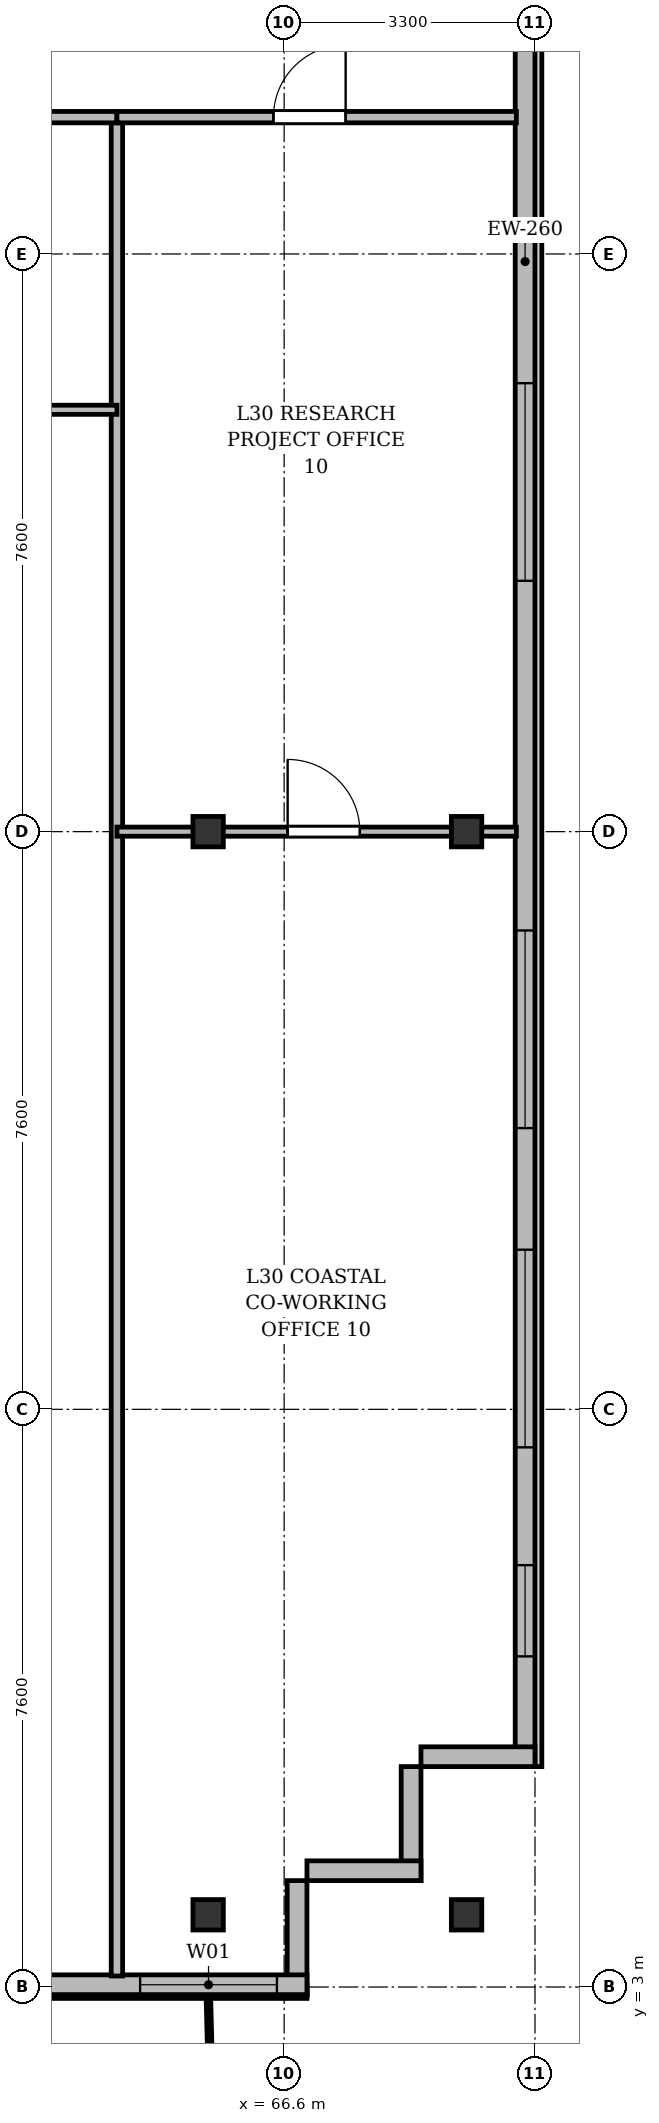
"""IFC4 building model, lengths in metres.
Left out: names, types, materials, properties, quantities, classifications, styles, units other than length and angle.
Written with IfcOpenShell. Run it as: python <this file> out.ifc"""

import sys

from ifc_helpers import new_model, si_unit, direction, frame, frame_2d, origin, origin_2d, place, context, subcontext, project, spatial, rectangle, i_section, extrude, source, transform, mapped, element, fill, save


model = new_model("IFC4")
c1 = context("Model", 3, precision=1e-05, world=origin(), true_north=direction((0.0, 1.0)))
c2 = subcontext(c1, "Body", "Model", "MODEL_VIEW")
j1 = project(units=[si_unit("LENGTHUNIT", "METRE"), si_unit("PLANEANGLEUNIT", "RADIAN")], contexts=[c1])
p1 = place(None, origin())
s1 = spatial("IfcSite", under=j1, at=p1, CompositionType="ELEMENT")
p2 = place(p1, origin())
s2 = spatial("IfcBuilding", under=s1, at=p2, CompositionType="ELEMENT")
p3 = place(p2, frame((0.0, 0.0, 117.7)))
s3 = spatial("IfcBuildingStorey", under=s2, at=p3, CompositionType="ELEMENT", Elevation=117.7)
m1 = source(origin(), c2, "Body", "SweptSolid", [
    extrude(i_section(OverallWidth=0.4, OverallDepth=0.4, WebThickness=0.022, FlangeThickness=0.035, at=origin_2d()), origin(), (0.0, 0.0, 1.0), 3.6),
])
for number, where, z_axis, x_axis in (
    (1, (65.6, 3.95, 0.0), (0.0, 0.0, 1.0), (1.0, 0.0, 0.0)),
    (2, (65.6, 18.2, 0.0), (0.0, 0.0, 1.0), (1.0, 0.0, 0.0)),
    (3, (69.0, 3.95, 0.0), (0.0, 0.0, 1.0), (1.0, 0.0, 0.0)),
    (4, (69.0, 18.2, 0.0), (0.0, 0.0, 1.0), (1.0, 0.0, 0.0)),
):
    element("IfcColumn", number, at=place(p3, frame(where, z_axis=z_axis, x_axis=x_axis)), inside=s3, PredefinedType="COLUMN", context=c2, shape_type="MappedRepresentation", body=[
        mapped(m1, transform((0.0, 0.0, 0.0), x_axis=(1.0, 0.0, 0.0), y_axis=(0.0, 1.0, 0.0), z_axis=(0.0, 0.0, 1.0), scale=1.0)),
    ])
p4 = place(p3, frame((69.77, 45.5, 0.0), z_axis=(0.0, 0.0, 1.0), x_axis=(0.0, -1.0, 0.0)))
e5 = element("IfcWall", 5, at=p4, inside=s3, PredefinedType="SOLIDWALL", context=c2, shape_type="SweptSolid", body=[
    extrude(rectangle(XDim=39.6, YDim=0.26, at=frame_2d((19.8, 0.0))), origin(), (0.0, 0.0, 1.0), 3.34),
])
p5 = place(p4, frame((36.95, 0.0, 0.92)))
e6 = element("IfcOpeningElement", 6, at=p5, cuts=e5, PredefinedType="OPENING", context=c2, shape_type="SweptSolid", body=[
    extrude(rectangle(XDim=1.2, YDim=1.65, at=frame_2d((0.6, 0.825))), frame((0.0, 0.14, 0.0), z_axis=(0.0, -1.0, 0.0), x_axis=(1.0, 0.0, 0.0)), (0.0, 0.0, 1.0), 0.28),
])
p6 = place(p4, frame((32.8, 0.0, 0.92)))
e7 = element("IfcOpeningElement", 7, at=p6, cuts=e5, PredefinedType="OPENING", context=c2, shape_type="SweptSolid", body=[
    extrude(rectangle(XDim=2.6, YDim=1.9, at=frame_2d((1.3, 0.95))), frame((0.0, 0.14, 0.0), z_axis=(0.0, -1.0, 0.0), x_axis=(1.0, 0.0, 0.0)), (0.0, 0.0, 1.0), 0.28),
])
p7 = place(p4, frame((28.6, 0.0, 0.92)))
e8 = element("IfcOpeningElement", 8, at=p7, cuts=e5, PredefinedType="OPENING", context=c2, shape_type="SweptSolid", body=[
    extrude(rectangle(XDim=2.6, YDim=1.9, at=frame_2d((1.3, 0.95))), frame((0.0, 0.14, 0.0), z_axis=(0.0, -1.0, 0.0), x_axis=(1.0, 0.0, 0.0)), (0.0, 0.0, 1.0), 0.28),
])
p8 = place(p4, frame((21.4, 0.0, 0.92)))
e9 = element("IfcOpeningElement", 9, at=p8, cuts=e5, PredefinedType="OPENING", context=c2, shape_type="SweptSolid", body=[
    extrude(rectangle(XDim=2.6, YDim=1.9, at=frame_2d((1.3, 0.95))), frame((0.0, 0.14, 0.0), z_axis=(0.0, -1.0, 0.0), x_axis=(1.0, 0.0, 0.0)), (0.0, 0.0, 1.0), 0.28),
])
p9 = place(p4, frame((7.4, 0.0, 0.92)))
e10 = element("IfcOpeningElement", 10, at=p9, cuts=e5, PredefinedType="OPENING", context=c2, shape_type="SweptSolid", body=[
    extrude(rectangle(XDim=2.6, YDim=1.9, at=frame_2d((1.3, 0.95))), frame((0.0, 0.14, 0.0), z_axis=(0.0, -1.0, 0.0), x_axis=(1.0, 0.0, 0.0)), (0.0, 0.0, 1.0), 0.28),
])
p10 = place(p4, frame((4.5, 0.0, 0.92)))
e11 = element("IfcOpeningElement", 11, at=p10, cuts=e5, PredefinedType="OPENING", context=c2, shape_type="SweptSolid", body=[
    extrude(rectangle(XDim=1.2, YDim=1.65, at=frame_2d((0.6, 0.825))), frame((0.0, 0.14, 0.0), z_axis=(0.0, -1.0, 0.0), x_axis=(1.0, 0.0, 0.0)), (0.0, 0.0, 1.0), 0.28),
])
p11 = place(p4, frame((1.15, 0.0, 0.92)))
e12 = element("IfcOpeningElement", 12, at=p11, cuts=e5, PredefinedType="OPENING", context=c2, shape_type="SweptSolid", body=[
    extrude(rectangle(XDim=1.2, YDim=1.65, at=frame_2d((0.6, 0.825))), frame((0.0, 0.14, 0.0), z_axis=(0.0, -1.0, 0.0), x_axis=(1.0, 0.0, 0.0)), (0.0, 0.0, 1.0), 0.28),
])
p12 = place(p3, frame((69.9, 6.03, 0.0), z_axis=(0.0, 0.0, 1.0), x_axis=(-1.0, 0.0, 0.0)))
e13 = element("IfcWall", 13, at=p12, inside=s3, PredefinedType="SOLIDWALL", context=c2, shape_type="SweptSolid", body=[
    extrude(rectangle(XDim=1.5, YDim=0.26, at=frame_2d((0.75, 0.0))), origin(), (0.0, 0.0, 1.0), 2.84),
])
for number, where, z_axis, x_axis in (
    (14, (68.27, 5.9, 0.0), (0.0, 0.0, 1.0), (0.0, -1.0, 0.0)),
    (15, (68.4, 4.53, 0.0), (0.0, 0.0, 1.0), (-1.0, 0.0, 0.0)),
):
    element("IfcWall", number, at=place(p3, frame(where, z_axis=z_axis, x_axis=x_axis)), inside=s3, PredefinedType="SOLIDWALL", context=c2, shape_type="SweptSolid", body=[
        extrude(rectangle(XDim=1.5, YDim=0.26, at=frame_2d((0.75, 0.0))), origin(), (0.0, 0.0, 1.0), 3.34),
    ])
p13 = place(p3, frame((66.77, 4.4, 0.0), z_axis=(0.0, 0.0, 1.0), x_axis=(0.0, -1.0, 0.0)))
e16 = element("IfcWall", 16, at=p13, inside=s3, PredefinedType="SOLIDWALL", context=c2, shape_type="SweptSolid", body=[
    extrude(rectangle(XDim=1.5, YDim=0.26, at=frame_2d((0.75, 0.0))), origin(), (0.0, 0.0, 1.0), 2.752),
])
p14 = place(p3, frame((66.9, 3.03, 0.0), z_axis=(0.0, 0.0, 1.0), x_axis=(-1.0, 0.0, 0.0)))
e17 = element("IfcWall", 17, at=p14, inside=s3, PredefinedType="SOLIDWALL", context=c2, shape_type="SweptSolid", body=[
    extrude(rectangle(XDim=59.4, YDim=0.26, at=frame_2d((29.7, 0.0))), origin(), (0.0, 0.0, 1.0), 3.34),
])
p15 = place(p14, frame((0.395, 0.0, 0.9)))
e18 = element("IfcOpeningElement", 18, at=p15, cuts=e17, PredefinedType="OPENING", context=c2, shape_type="SweptSolid", body=[
    extrude(rectangle(XDim=1.8, YDim=1.8, at=frame_2d((0.9, 0.9))), frame((0.0, 0.14, 0.0), z_axis=(0.0, -1.0, 0.0), x_axis=(1.0, 0.0, 0.0)), (0.0, 0.0, 1.0), 0.28),
])
p16 = place(p14, frame((4.2, 0.0, 0.9)))
e19 = element("IfcOpeningElement", 19, at=p16, cuts=e17, PredefinedType="OPENING", context=c2, shape_type="SweptSolid", body=[
    extrude(rectangle(XDim=2.2, YDim=1.8, at=frame_2d((1.1, 0.9))), frame((0.0, 0.14, 0.0), z_axis=(0.0, -1.0, 0.0), x_axis=(1.0, 0.0, 0.0)), (0.0, 0.0, 1.0), 0.28),
])
p17 = place(p14, frame((11.25, 0.0, 0.9)))
e20 = element("IfcOpeningElement", 20, at=p17, cuts=e17, PredefinedType="OPENING", context=c2, shape_type="SweptSolid", body=[
    extrude(rectangle(XDim=1.5, YDim=1.75, at=frame_2d((0.75, 0.875))), frame((0.0, 0.14, 0.0), z_axis=(0.0, -1.0, 0.0), x_axis=(1.0, 0.0, 0.0)), (0.0, 0.0, 1.0), 0.28),
])
p18 = place(p14, frame((16.92, 0.0, 0.0)))
e21 = element("IfcOpeningElement", 21, at=p18, cuts=e17, PredefinedType="OPENING", context=c2, shape_type="SweptSolid", body=[
    extrude(rectangle(XDim=1.2, YDim=2.2, at=frame_2d((0.6, 1.1))), frame((0.0, 0.14, 0.0), z_axis=(0.0, -1.0, 0.0), x_axis=(1.0, 0.0, 0.0)), (0.0, 0.0, 1.0), 0.28),
])
p19 = place(p14, frame((18.675, 0.0, 0.9)))
e22 = element("IfcOpeningElement", 22, at=p19, cuts=e17, PredefinedType="OPENING", context=c2, shape_type="SweptSolid", body=[
    extrude(rectangle(XDim=1.65, YDim=1.85, at=frame_2d((0.825, 0.925))), frame((0.0, 0.14, 0.0), z_axis=(0.0, -1.0, 0.0), x_axis=(1.0, 0.0, 0.0)), (0.0, 0.0, 1.0), 0.28),
])
p20 = place(p14, frame((21.0, 0.0, 0.9)))
e23 = element("IfcOpeningElement", 23, at=p20, cuts=e17, PredefinedType="OPENING", context=c2, shape_type="SweptSolid", body=[
    extrude(rectangle(XDim=1.8, YDim=1.8, at=frame_2d((0.9, 0.9))), frame((0.0, 0.14, 0.0), z_axis=(0.0, -1.0, 0.0), x_axis=(1.0, 0.0, 0.0)), (0.0, 0.0, 1.0), 0.28),
])
p21 = place(p14, frame((26.3, 0.0, 0.9)))
e24 = element("IfcOpeningElement", 24, at=p21, cuts=e17, PredefinedType="OPENING", context=c2, shape_type="SweptSolid", body=[
    extrude(rectangle(XDim=2.2, YDim=1.8, at=frame_2d((1.1, 0.9))), frame((0.0, 0.14, 0.0), z_axis=(0.0, -1.0, 0.0), x_axis=(1.0, 0.0, 0.0)), (0.0, 0.0, 1.0), 0.28),
])
p22 = place(p14, frame((32.8, 0.0, 0.9)))
e25 = element("IfcOpeningElement", 25, at=p22, cuts=e17, PredefinedType="OPENING", context=c2, shape_type="SweptSolid", body=[
    extrude(rectangle(XDim=1.5, YDim=1.75, at=frame_2d((0.75, 0.875))), frame((0.0, 0.14, 0.0), z_axis=(0.0, -1.0, 0.0), x_axis=(1.0, 0.0, 0.0)), (0.0, 0.0, 1.0), 0.28),
])
p23 = place(p14, frame((36.25, 0.0, 0.9)))
e26 = element("IfcOpeningElement", 26, at=p23, cuts=e17, PredefinedType="OPENING", context=c2, shape_type="SweptSolid", body=[
    extrude(rectangle(XDim=2.0, YDim=1.95, at=frame_2d((1.0, 0.975))), frame((0.0, 0.14, 0.0), z_axis=(0.0, -1.0, 0.0), x_axis=(1.0, 0.0, 0.0)), (0.0, 0.0, 1.0), 0.28),
])
p24 = place(p14, frame((39.775, 0.0, 0.9)))
e27 = element("IfcOpeningElement", 27, at=p24, cuts=e17, PredefinedType="OPENING", context=c2, shape_type="SweptSolid", body=[
    extrude(rectangle(XDim=1.65, YDim=1.85, at=frame_2d((0.825, 0.925))), frame((0.0, 0.14, 0.0), z_axis=(0.0, -1.0, 0.0), x_axis=(1.0, 0.0, 0.0)), (0.0, 0.0, 1.0), 0.28),
])
p25 = place(p14, frame((42.7, 0.0, 0.9)))
e28 = element("IfcOpeningElement", 28, at=p25, cuts=e17, PredefinedType="OPENING", context=c2, shape_type="SweptSolid", body=[
    extrude(rectangle(XDim=1.8, YDim=1.8, at=frame_2d((0.9, 0.9))), frame((0.0, 0.14, 0.0), z_axis=(0.0, -1.0, 0.0), x_axis=(1.0, 0.0, 0.0)), (0.0, 0.0, 1.0), 0.28),
])
p26 = place(p14, frame((46.435, 0.0, 0.0)))
e29 = element("IfcOpeningElement", 29, at=p26, cuts=e17, PredefinedType="OPENING", context=c2, shape_type="SweptSolid", body=[
    extrude(rectangle(XDim=1.2, YDim=2.2, at=frame_2d((0.6, 1.1))), frame((0.0, 0.14, 0.0), z_axis=(0.0, -1.0, 0.0), x_axis=(1.0, 0.0, 0.0)), (0.0, 0.0, 1.0), 0.28),
])
p27 = place(p14, frame((49.0, 0.0, 0.9)))
e30 = element("IfcOpeningElement", 30, at=p27, cuts=e17, PredefinedType="OPENING", context=c2, shape_type="SweptSolid", body=[
    extrude(rectangle(XDim=1.5, YDim=1.75, at=frame_2d((0.75, 0.875))), frame((0.0, 0.14, 0.0), z_axis=(0.0, -1.0, 0.0), x_axis=(1.0, 0.0, 0.0)), (0.0, 0.0, 1.0), 0.28),
])
p28 = place(p14, frame((53.0, 0.0, 0.9)))
e31 = element("IfcOpeningElement", 31, at=p28, cuts=e17, PredefinedType="OPENING", context=c2, shape_type="SweptSolid", body=[
    extrude(rectangle(XDim=2.0, YDim=1.95, at=frame_2d((1.0, 0.975))), frame((0.0, 0.14, 0.0), z_axis=(0.0, -1.0, 0.0), x_axis=(1.0, 0.0, 0.0)), (0.0, 0.0, 1.0), 0.28),
])
p29 = place(p14, frame((57.18, 0.0, 0.9)))
e32 = element("IfcOpeningElement", 32, at=p29, cuts=e17, PredefinedType="OPENING", context=c2, shape_type="SweptSolid", body=[
    extrude(rectangle(XDim=1.65, YDim=1.85, at=frame_2d((0.825, 0.925))), frame((0.0, 0.14, 0.0), z_axis=(0.0, -1.0, 0.0), x_axis=(1.0, 0.0, 0.0)), (0.0, 0.0, 1.0), 0.28),
])
p30 = place(p3, frame((64.4, 3.145, 0.0), z_axis=(0.0, 0.0, 1.0), x_axis=(0.0, 1.0, 0.0)))
e33 = element("IfcWall", 33, at=p30, inside=s3, PredefinedType="PARTITIONING", context=c2, shape_type="SweptSolid", body=[
    extrude(rectangle(XDim=24.455, YDim=0.15, at=frame_2d((12.228, 0.0))), origin(), (0.0, 0.0, 1.0), 2.752),
])
p31 = place(p3, frame((58.8, 27.6, 0.0), z_axis=(0.0, 0.0, 1.0), x_axis=(1.0, 0.0, 0.0)))
e34 = element("IfcWall", 34, at=p31, inside=s3, PredefinedType="PARTITIONING", context=c2, shape_type="SweptSolid", body=[
    extrude(rectangle(XDim=5.6, YDim=0.15, at=frame_2d((2.8, 0.0))), origin(), (0.0, 0.0, 1.0), 2.84),
])
p32 = place(p31, frame((2.232, 0.0, 0.0)))
e35 = element("IfcOpeningElement", 35, at=p32, cuts=e34, PredefinedType="OPENING", context=c2, shape_type="SweptSolid", body=[
    extrude(rectangle(XDim=0.95, YDim=2.15, at=frame_2d((0.475, 1.075))), frame((0.0, 0.085, 0.0), z_axis=(0.0, -1.0, 0.0), x_axis=(1.0, 0.0, 0.0)), (0.0, 0.0, 1.0), 0.17),
])
p33 = place(p3, frame((58.8, 23.75, 0.0), z_axis=(0.0, 0.0, 1.0), x_axis=(1.0, 0.0, 0.0)))
e36 = element("IfcWall", 36, at=p33, inside=s3, PredefinedType="PARTITIONING", context=c2, shape_type="SweptSolid", body=[
    extrude(rectangle(XDim=5.6, YDim=0.12, at=frame_2d((2.8, 0.0))), origin(), (0.0, 0.0, 1.0), 2.84),
])
p34 = place(p33, frame((2.232, 0.0, 0.0)))
e37 = element("IfcOpeningElement", 37, at=p34, cuts=e36, PredefinedType="OPENING", context=c2, shape_type="SweptSolid", body=[
    extrude(rectangle(XDim=0.95, YDim=2.15, at=frame_2d((0.475, 1.075))), frame((0.0, 0.07, 0.0), z_axis=(0.0, -1.0, 0.0), x_axis=(1.0, 0.0, 0.0)), (0.0, 0.0, 1.0), 0.14),
])
p35 = place(p3, frame((64.4, 27.6, 0.0), z_axis=(0.0, 0.0, 1.0), x_axis=(1.0, 0.0, 0.0)))
e38 = element("IfcWall", 38, at=p35, inside=s3, PredefinedType="PARTITIONING", context=c2, shape_type="SweptSolid", body=[
    extrude(rectangle(XDim=5.255, YDim=0.15, at=frame_2d((2.627, 0.0))), origin(), (0.0, 0.0, 1.0), 2.84),
])
p36 = place(p35, frame((2.059, 0.0, 0.0)))
e39 = element("IfcOpeningElement", 39, at=p36, cuts=e38, PredefinedType="OPENING", context=c2, shape_type="SweptSolid", body=[
    extrude(rectangle(XDim=0.95, YDim=2.15, at=frame_2d((0.475, 1.075))), frame((0.0, 0.085, 0.0), z_axis=(0.0, -1.0, 0.0), x_axis=(1.0, 0.0, 0.0)), (0.0, 0.0, 1.0), 0.17),
])
p37 = place(p3, frame((64.4, 18.2, 0.0), z_axis=(0.0, 0.0, 1.0), x_axis=(1.0, 0.0, 0.0)))
e40 = element("IfcWall", 40, at=p37, inside=s3, PredefinedType="PARTITIONING", context=c2, shape_type="SweptSolid", body=[
    extrude(rectangle(XDim=5.255, YDim=0.12, at=frame_2d((2.627, 0.0))), origin(), (0.0, 0.0, 1.0), 2.752),
])
p38 = place(p37, frame((2.246, 0.0, 0.0)))
e41 = element("IfcOpeningElement", 41, at=p38, cuts=e40, PredefinedType="OPENING", context=c2, shape_type="SweptSolid", body=[
    extrude(rectangle(XDim=0.95, YDim=2.15, at=frame_2d((0.475, 1.075))), frame((0.0, 0.07, 0.0), z_axis=(0.0, -1.0, 0.0), x_axis=(1.0, 0.0, 0.0)), (0.0, 0.0, 1.0), 0.14),
])
m2 = source(origin(), c2, "Body", "SweptSolid", [
    extrude(rectangle(XDim=1.2, YDim=1.65, at=frame_2d((0.6, 0.825))), frame((0.0, 0.03, 0.0), z_axis=(0.0, -1.0, 0.0), x_axis=(1.0, 0.0, 0.0)), (0.0, 0.0, 1.0), 0.06),
])
p39 = place(p5, origin())
e42 = element("IfcWindow", 42, at=p39, inside=s3, PartitioningType="SINGLE_PANEL", PredefinedType="WINDOW", context=c2, shape_type="MappedRepresentation", body=[
    mapped(m2, transform((0.0, 0.0, 0.0), x_axis=(1.0, 0.0, 0.0), y_axis=(0.0, 1.0, 0.0), z_axis=(0.0, 0.0, 1.0), scale=1.0)),
])
fill(e6, e42)
m3 = source(origin(), c2, "Body", "SweptSolid", [
    extrude(rectangle(XDim=2.6, YDim=1.9, at=frame_2d((1.3, 0.95))), frame((0.0, 0.03, 0.0), z_axis=(0.0, -1.0, 0.0), x_axis=(1.0, 0.0, 0.0)), (0.0, 0.0, 1.0), 0.06),
])
p40 = place(p6, origin())
e43 = element("IfcWindow", 43, at=p40, inside=s3, PartitioningType="SINGLE_PANEL", PredefinedType="WINDOW", context=c2, shape_type="MappedRepresentation", body=[
    mapped(m3, transform((0.0, 0.0, 0.0), x_axis=(1.0, 0.0, 0.0), y_axis=(0.0, 1.0, 0.0), z_axis=(0.0, 0.0, 1.0), scale=1.0)),
])
fill(e7, e43)
p41 = place(p7, origin())
e44 = element("IfcWindow", 44, at=p41, inside=s3, PartitioningType="SINGLE_PANEL", PredefinedType="WINDOW", context=c2, shape_type="MappedRepresentation", body=[
    mapped(m3, transform((0.0, 0.0, 0.0), x_axis=(1.0, 0.0, 0.0), y_axis=(0.0, 1.0, 0.0), z_axis=(0.0, 0.0, 1.0), scale=1.0)),
])
fill(e8, e44)
p42 = place(p8, origin())
e45 = element("IfcWindow", 45, at=p42, inside=s3, PartitioningType="SINGLE_PANEL", PredefinedType="WINDOW", context=c2, shape_type="MappedRepresentation", body=[
    mapped(m3, transform((0.0, 0.0, 0.0), x_axis=(1.0, 0.0, 0.0), y_axis=(0.0, 1.0, 0.0), z_axis=(0.0, 0.0, 1.0), scale=1.0)),
])
fill(e9, e45)
m4 = source(origin(), c2, "Body", "SweptSolid", [
    extrude(rectangle(XDim=1.8, YDim=1.8, at=frame_2d((0.9, 0.9))), frame((0.0, 0.03, 0.0), z_axis=(0.0, -1.0, 0.0), x_axis=(1.0, 0.0, 0.0)), (0.0, 0.0, 1.0), 0.06),
])
p43 = place(p15, origin())
e46 = element("IfcWindow", 46, at=p43, inside=s3, PartitioningType="SINGLE_PANEL", PredefinedType="WINDOW", context=c2, shape_type="MappedRepresentation", body=[
    mapped(m4, transform((0.0, 0.0, 0.0), x_axis=(1.0, 0.0, 0.0), y_axis=(0.0, 1.0, 0.0), z_axis=(0.0, 0.0, 1.0), scale=1.0)),
])
fill(e18, e46)
m5 = source(origin(), c2, "Body", "SweptSolid", [
    extrude(rectangle(XDim=0.95, YDim=2.15, at=frame_2d((0.475, 1.075))), frame((0.0, 0.025, 0.0), z_axis=(0.0, -1.0, 0.0), x_axis=(1.0, 0.0, 0.0)), (0.0, 0.0, 1.0), 0.05),
])
p44 = place(p36, origin())
e47 = element("IfcDoor", 47, at=p44, inside=s3, OperationType="SINGLE_SWING_RIGHT", PredefinedType="DOOR", context=c2, shape_type="MappedRepresentation", body=[
    mapped(m5, transform((0.0, 0.0, 0.0), x_axis=(1.0, 0.0, 0.0), y_axis=(0.0, 1.0, 0.0), z_axis=(0.0, 0.0, 1.0), scale=1.0)),
])
fill(e39, e47)
p45 = place(p38, origin())
e48 = element("IfcDoor", 48, at=p45, inside=s3, OperationType="SINGLE_SWING_LEFT", PredefinedType="DOOR", context=c2, shape_type="MappedRepresentation", body=[
    mapped(m5, transform((0.0, 0.0, 0.0), x_axis=(1.0, 0.0, 0.0), y_axis=(0.0, 1.0, 0.0), z_axis=(0.0, 0.0, 1.0), scale=1.0)),
])
fill(e41, e48)
save(model, sys.argv[1])
